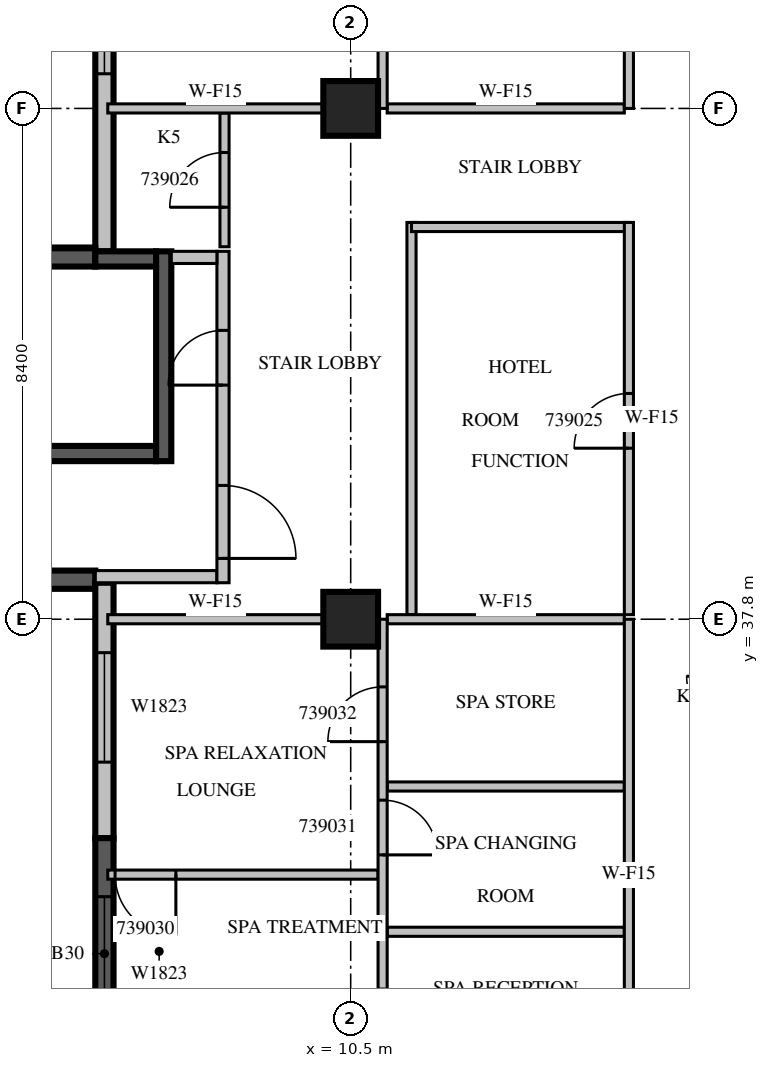
"""IFC4 building model, lengths in metres.
Left out: names, types, materials, properties, quantities, classifications, styles, units other than length and angle.
Written with IfcOpenShell. Run it as: python <this file> out.ifc"""

import sys

from ifc_helpers import new_model, si_unit, direction, frame, frame_2d, origin, origin_2d, place, context, subcontext, project, spatial, rectangle, extrude, source, transform, mapped, element, fill, save


model = new_model("IFC4")
c1 = context("Model", 3, precision=1e-05, world=origin(), true_north=direction((0.0, 1.0)))
c2 = subcontext(c1, "Body", "Model", "MODEL_VIEW")
j1 = project(units=[si_unit("LENGTHUNIT", "METRE"), si_unit("PLANEANGLEUNIT", "RADIAN")], contexts=[c1])
p1 = place(None, origin())
s1 = spatial("IfcSite", under=j1, at=p1, CompositionType="ELEMENT")
p2 = place(p1, origin())
s2 = spatial("IfcBuilding", under=s1, at=p2, CompositionType="ELEMENT")
p3 = place(p2, frame((0.0, 0.0, 181.6)))
s3 = spatial("IfcBuildingStorey", under=s2, at=p3, CompositionType="ELEMENT", Elevation=181.6)
m1 = source(origin(), c2, "Body", "SweptSolid", [
    extrude(rectangle(XDim=0.9, YDim=0.9, at=origin_2d()), origin(), (0.0, 0.0, 1.0), 3.8),
])
for number, where, z_axis, x_axis in (
    (1, (10.5, 37.8, 0.0), (0.0, 0.0, 1.0), (1.0, 0.0, 0.0)),
    (2, (10.5, 46.2, 0.0), (0.0, 0.0, 1.0), (1.0, 0.0, 0.0)),
):
    element("IfcColumn", number, at=place(p3, frame(where, z_axis=z_axis, x_axis=x_axis)), inside=s3, PredefinedType="COLUMN", context=c2, shape_type="MappedRepresentation", body=[
        mapped(m1, transform((0.0, 0.0, 0.0), scale=1.0)),
    ])
m2 = source(origin(), c2, "Body", "SweptSolid", [
    extrude(rectangle(XDim=9.91, YDim=0.3, at=frame_2d((4.955, 0.0))), origin(), (0.0, 0.0, 1.0), 3.4),
])
p4 = place(p3, frame((6.45, 53.76, 0.0), z_axis=(0.0, 0.0, 1.0), x_axis=(0.0, -1.0, 0.0)))
e3 = element("IfcWall", 3, at=p4, inside=s3, PredefinedType="STANDARD", context=c2, shape_type="MappedRepresentation", body=[
    mapped(m2, transform((0.0, 0.0, 0.0), scale=1.0)),
])
m3 = source(origin(), c2, "Body", "SweptSolid", [
    extrude(rectangle(XDim=3.6, YDim=2.3, at=frame_2d((1.8, 1.15))), frame((0.0, 0.16, 0.0), z_axis=(0.0, -1.0, 0.0), x_axis=(1.0, 0.0, 0.0)), (0.0, 0.0, 1.0), 0.32),
])
p5 = place(p4, frame((3.39, 0.0, 0.6)))
e4 = element("IfcOpeningElement", 4, at=p5, cuts=e3, PredefinedType="OPENING", context=c2, shape_type="MappedRepresentation", body=[
    mapped(m3, transform((0.0, 0.0, 0.0), scale=1.0)),
])
m4 = source(origin(), c2, "Body", "SweptSolid", [
    extrude(rectangle(XDim=2.4, YDim=2.3, at=frame_2d((1.2, 1.15))), frame((0.0, 0.16, 0.0), z_axis=(0.0, -1.0, 0.0), x_axis=(1.0, 0.0, 0.0)), (0.0, 0.0, 1.0), 0.32),
])
p6 = place(p4, frame((0.495, 0.0, 0.6)))
e5 = element("IfcOpeningElement", 5, at=p6, cuts=e3, PredefinedType="OPENING", context=c2, shape_type="MappedRepresentation", body=[
    mapped(m4, transform((0.0, 0.0, 0.0), scale=1.0)),
])
m5 = source(origin(), c2, "Body", "SweptSolid", [
    extrude(rectangle(XDim=6.1, YDim=0.3, at=frame_2d((3.05, 0.0))), origin(), (0.0, 0.0, 1.0), 3.4),
])
for number, where, z_axis, x_axis in (
    (6, (6.3, 43.75, 0.0), (0.0, 0.0, 1.0), (-1.0, 0.0, 0.0)),
    (7, (0.2, 38.45, 0.0), (0.0, 0.0, 1.0), (1.0, 0.0, 0.0)),
):
    element("IfcWall", number, at=place(p3, frame(where, z_axis=z_axis, x_axis=x_axis)), inside=s3, PredefinedType="SOLIDWALL", context=c2, shape_type="MappedRepresentation", body=[
        mapped(m5, transform((0.0, 0.0, 0.0), scale=1.0)),
    ])
m6 = source(origin(), c2, "Body", "SweptSolid", [
    extrude(rectangle(XDim=4.2, YDim=0.3, at=frame_2d((2.1, 0.0))), origin(), (0.0, 0.0, 1.0), 3.4),
])
p7 = place(p3, frame((6.45, 38.4, 0.0), z_axis=(0.0, 0.0, 1.0), x_axis=(0.0, -1.0, 0.0)))
e8 = element("IfcWall", 8, at=p7, inside=s3, PredefinedType="STANDARD", context=c2, shape_type="MappedRepresentation", body=[
    mapped(m6, transform((0.0, 0.0, 0.0), scale=1.0)),
])
m7 = source(origin(), c2, "Body", "SweptSolid", [
    extrude(rectangle(XDim=1.8, YDim=2.3, at=frame_2d((0.9, 1.15))), frame((0.0, 0.16, 0.0), z_axis=(0.0, -1.0, 0.0), x_axis=(1.0, 0.0, 0.0)), (0.0, 0.0, 1.0), 0.32),
])
p8 = place(p7, frame((1.15, 0.0, 0.6)))
e9 = element("IfcOpeningElement", 9, at=p8, cuts=e8, PredefinedType="OPENING", context=c2, shape_type="MappedRepresentation", body=[
    mapped(m7, transform((0.0, 0.0, 0.0), scale=1.0)),
])
m8 = source(origin(), c2, "Body", "SweptSolid", [
    extrude(rectangle(XDim=3.8, YDim=0.3, at=frame_2d((1.9, 0.0))), origin(), (0.0, 0.0, 1.0), 3.4),
])
p9 = place(p3, frame((6.45, 34.2, 0.0), z_axis=(0.0, 0.0, 1.0), x_axis=(0.0, -1.0, 0.0)))
e10 = element("IfcWall", 10, at=p9, inside=s3, PredefinedType="SOLIDWALL", context=c2, shape_type="MappedRepresentation", body=[
    mapped(m8, transform((0.0, 0.0, 0.0), scale=1.0)),
])
p10 = place(p9, frame((0.963, 0.0, 0.6)))
e11 = element("IfcOpeningElement", 11, at=p10, cuts=e10, PredefinedType="OPENING", context=c2, shape_type="MappedRepresentation", body=[
    mapped(m7, transform((0.0, 0.0, 0.0), scale=1.0)),
])
m9 = source(origin(), c2, "Body", "SweptSolid", [
    extrude(rectangle(XDim=7.0, YDim=0.25, at=frame_2d((3.5, 0.0))), origin(), (0.0, 0.0, 1.0), 3.4),
])
p11 = place(p3, frame((0.3, 40.525, 0.0), z_axis=(0.0, 0.0, 1.0), x_axis=(1.0, 0.0, 0.0)))
e12 = element("IfcWall", 12, at=p11, inside=s3, PredefinedType="SOLIDWALL", context=c2, shape_type="MappedRepresentation", body=[
    mapped(m9, transform((0.0, 0.0, 0.0), scale=1.0)),
])
m10 = source(origin(), c2, "Body", "SweptSolid", [
    extrude(rectangle(XDim=1.1, YDim=2.1, at=frame_2d((0.55, 1.05))), frame((0.0, 0.135, 0.0), z_axis=(0.0, -1.0, 0.0), x_axis=(1.0, 0.0, 0.0)), (0.0, 0.0, 1.0), 0.27),
])
p12 = place(p11, frame((0.55, 0.0, 0.0)))
e13 = element("IfcOpeningElement", 13, at=p12, cuts=e12, PredefinedType="OPENING", context=c2, shape_type="MappedRepresentation", body=[
    mapped(m10, transform((0.0, 0.0, 0.0), scale=1.0)),
])
m11 = source(origin(), c2, "Body", "SweptSolid", [
    extrude(rectangle(XDim=1.0, YDim=0.25, at=frame_2d((0.5, 0.0))), origin(), (0.0, 0.0, 1.0), 3.4),
])
p13 = place(p3, frame((6.3, 43.725, 0.0), z_axis=(0.0, 0.0, 1.0), x_axis=(1.0, 0.0, 0.0)))
e14 = element("IfcWall", 14, at=p13, inside=s3, PredefinedType="SOLIDWALL", context=c2, shape_type="MappedRepresentation", body=[
    mapped(m11, transform((0.0, 0.0, 0.0), scale=1.0)),
])
m12 = source(origin(), c2, "Body", "SweptSolid", [
    extrude(rectangle(XDim=3.45, YDim=0.25, at=frame_2d((1.725, 0.0))), origin(), (0.0, 0.0, 1.0), 3.4),
])
p14 = place(p3, frame((7.425, 40.4, 0.0), z_axis=(0.0, 0.0, 1.0), x_axis=(0.0, 1.0, 0.0)))
e15 = element("IfcWall", 15, at=p14, inside=s3, PredefinedType="SOLIDWALL", context=c2, shape_type="MappedRepresentation", body=[
    mapped(m12, transform((0.0, 0.0, 0.0), scale=1.0)),
])
m13 = source(origin(), c2, "Body", "SweptSolid", [
    extrude(rectangle(XDim=2.0, YDim=0.2, at=frame_2d((1.0, 0.0))), origin(), (0.0, 0.0, 1.0), 3.4),
])
p15 = place(p3, frame((6.3, 38.5, 0.0), z_axis=(0.0, 0.0, 1.0), x_axis=(1.0, 0.0, 0.0)))
e16 = element("IfcWall", 16, at=p15, inside=s3, PredefinedType="PARTITIONING", context=c2, shape_type="MappedRepresentation", body=[
    mapped(m13, transform((0.0, 0.0, 0.0), scale=1.0)),
])
m14 = source(origin(), c2, "Body", "SweptSolid", [
    extrude(rectangle(XDim=5.45, YDim=0.2, at=frame_2d((2.725, 0.0))), origin(), (0.0, 0.0, 1.0), 3.4),
])
p16 = place(p3, frame((8.4, 38.4, 0.0), z_axis=(0.0, 0.0, 1.0), x_axis=(0.0, 1.0, 0.0)))
e17 = element("IfcWall", 17, at=p16, inside=s3, PredefinedType="PARTITIONING", context=c2, shape_type="MappedRepresentation", body=[
    mapped(m14, transform((0.0, 0.0, 0.0), scale=1.0)),
])
m15 = source(origin(), c2, "Body", "SweptSolid", [
    extrude(rectangle(XDim=1.2, YDim=2.1, at=frame_2d((0.6, 1.05))), frame((0.0, 0.11, 0.0), z_axis=(0.0, -1.0, 0.0), x_axis=(1.0, 0.0, 0.0)), (0.0, 0.0, 1.0), 0.22),
])
p17 = place(p16, frame((0.4, 0.0, 0.0)))
e18 = element("IfcOpeningElement", 18, at=p17, cuts=e17, PredefinedType="OPENING", context=c2, shape_type="MappedRepresentation", body=[
    mapped(m15, transform((0.0, 0.0, 0.0), scale=1.0)),
])
m16 = source(origin(), c2, "Body", "SweptSolid", [
    extrude(rectangle(XDim=0.9, YDim=2.1, at=frame_2d((0.45, 1.05))), frame((0.0, 0.11, 0.0), z_axis=(0.0, -1.0, 0.0), x_axis=(1.0, 0.0, 0.0)), (0.0, 0.0, 1.0), 0.22),
])
p18 = place(p16, frame((3.25, 0.0, 0.0)))
e19 = element("IfcOpeningElement", 19, at=p18, cuts=e17, PredefinedType="OPENING", context=c2, shape_type="MappedRepresentation", body=[
    mapped(m16, transform((0.0, 0.0, 0.0), scale=1.0)),
])
m17 = source(origin(), c2, "Body", "SweptSolid", [
    extrude(rectangle(XDim=0.75, YDim=0.2, at=frame_2d((0.375, 0.0))), origin(), (0.0, 0.0, 1.0), 3.4),
])
p19 = place(p3, frame((7.55, 43.75, 0.0), z_axis=(0.0, 0.0, 1.0), x_axis=(1.0, 0.0, 0.0)))
e20 = element("IfcWall", 20, at=p19, inside=s3, PredefinedType="PARTITIONING", context=c2, shape_type="MappedRepresentation", body=[
    mapped(m17, transform((0.0, 0.0, 0.0), scale=1.0)),
])
m18 = source(origin(), c2, "Body", "SweptSolid", [
    extrude(rectangle(XDim=6.45, YDim=0.15, at=frame_2d((3.225, 0.0))), origin(), (0.0, 0.0, 1.0), 3.4),
])
p20 = place(p3, frame((11.5, 44.325, 0.0), z_axis=(0.0, 0.0, 1.0), x_axis=(0.0, -1.0, 0.0)))
e21 = element("IfcWall", 21, at=p20, inside=s3, PredefinedType="PARTITIONING", context=c2, shape_type="MappedRepresentation", body=[
    mapped(m18, transform((0.0, 0.0, 0.0), scale=1.0)),
])
m19 = source(origin(), c2, "Body", "SweptSolid", [
    extrude(rectangle(XDim=3.575, YDim=0.15, at=frame_2d((1.788, 0.0))), origin(), (0.0, 0.0, 1.0), 3.4),
])
p21 = place(p3, frame((15.075, 44.25, 0.0), z_axis=(0.0, 0.0, 1.0), x_axis=(-1.0, 0.0, 0.0)))
e22 = element("IfcWall", 22, at=p21, inside=s3, PredefinedType="PARTITIONING", context=c2, shape_type="MappedRepresentation", body=[
    mapped(m19, transform((0.0, 0.0, 0.0), scale=1.0)),
])
p22 = place(p3, frame((15.075, 37.875, 0.0), z_axis=(0.0, 0.0, 1.0), x_axis=(0.0, 1.0, 0.0)))
e23 = element("IfcWall", 23, at=p22, inside=s3, PredefinedType="PARTITIONING", context=c2, shape_type="MappedRepresentation", body=[
    mapped(m18, transform((0.0, 0.0, 0.0), scale=1.0)),
])
m20 = source(origin(), c2, "Body", "SweptSolid", [
    extrude(rectangle(XDim=0.9, YDim=2.1, at=frame_2d((0.45, 1.05))), frame((0.0, 0.085, 0.0), z_axis=(0.0, -1.0, 0.0), x_axis=(1.0, 0.0, 0.0)), (0.0, 0.0, 1.0), 0.17),
])
p23 = place(p22, frame((2.737, 0.0, 0.0)))
e24 = element("IfcOpeningElement", 24, at=p23, cuts=e23, PredefinedType="OPENING", context=c2, shape_type="MappedRepresentation", body=[
    mapped(m20, transform((0.0, 0.0, 0.0), scale=1.0)),
])
m21 = source(origin(), c2, "Body", "SweptSolid", [
    extrude(rectangle(XDim=2.2, YDim=0.15, at=frame_2d((1.1, 0.0))), origin(), (0.0, 0.0, 1.0), 3.4),
])
p24 = place(p3, frame((8.425, 43.925, 0.0), z_axis=(0.0, 0.0, 1.0), x_axis=(0.0, 1.0, 0.0)))
e25 = element("IfcWall", 25, at=p24, inside=s3, PredefinedType="PARTITIONING", context=c2, shape_type="MappedRepresentation", body=[
    mapped(m21, transform((0.0, 0.0, 0.0), scale=1.0)),
])
p25 = place(p24, frame((0.65, 0.0, 0.0)))
e26 = element("IfcOpeningElement", 26, at=p25, cuts=e25, PredefinedType="OPENING", context=c2, shape_type="MappedRepresentation", body=[
    mapped(m20, transform((0.0, 0.0, 0.0), scale=1.0)),
])
m22 = source(origin(), c2, "Body", "SweptSolid", [
    extrude(rectangle(XDim=4.445, YDim=0.15, at=frame_2d((2.223, 0.0))), origin(), (0.0, 0.0, 1.0), 3.4),
])
p26 = place(p3, frame((10.95, 33.6, 0.0), z_axis=(0.0, 0.0, 1.0), x_axis=(-1.0, 0.0, 0.0)))
e27 = element("IfcWall", 27, at=p26, inside=s3, PredefinedType="PARTITIONING", context=c2, shape_type="MappedRepresentation", body=[
    mapped(m22, transform((0.0, 0.0, 0.0), scale=1.0)),
])
m23 = source(origin(), c2, "Body", "SweptSolid", [
    extrude(rectangle(XDim=1.0, YDim=2.1, at=frame_2d((0.5, 1.05))), frame((0.0, 0.085, 0.0), z_axis=(0.0, -1.0, 0.0), x_axis=(1.0, 0.0, 0.0)), (0.0, 0.0, 1.0), 0.17),
])
p27 = place(p26, frame((3.325, 0.0, 0.0)))
e28 = element("IfcOpeningElement", 28, at=p27, cuts=e27, PredefinedType="OPENING", context=c2, shape_type="MappedRepresentation", body=[
    mapped(m23, transform((0.0, 0.0, 0.0), scale=1.0)),
])
m24 = source(origin(), c2, "Body", "SweptSolid", [
    extrude(rectangle(XDim=3.9, YDim=0.15, at=frame_2d((1.95, 0.0))), origin(), (0.0, 0.0, 1.0), 3.4),
])
for number, where, z_axis, x_axis in (
    (29, (15.0, 32.66, 0.0), (0.0, 0.0, 1.0), (-1.0, 0.0, 0.0)),
    (30, (15.0, 35.049, 0.0), (0.0, 0.0, 1.0), (-1.0, 0.0, 0.0)),
):
    element("IfcWall", number, at=place(p3, frame(where, z_axis=z_axis, x_axis=x_axis)), inside=s3, PredefinedType="PARTITIONING", context=c2, shape_type="MappedRepresentation", body=[
        mapped(m24, transform((0.0, 0.0, 0.0), scale=1.0)),
    ])
m25 = source(origin(), c2, "Body", "SweptSolid", [
    extrude(rectangle(XDim=3.546, YDim=0.15, at=frame_2d((1.773, 0.0))), origin(), (0.0, 0.0, 1.0), 3.4),
])
p28 = place(p3, frame((10.051, 37.8, 0.0), z_axis=(0.0, 0.0, 1.0), x_axis=(-1.0, 0.0, 0.0)))
e31 = element("IfcWall", 31, at=p28, inside=s3, PredefinedType="PARTITIONING", context=c2, shape_type="MappedRepresentation", body=[
    mapped(m25, transform((0.0, 0.0, 0.0), scale=1.0)),
])
p29 = place(p3, frame((15.0, 37.8, 0.0), z_axis=(0.0, 0.0, 1.0), x_axis=(-1.0, 0.0, 0.0)))
e32 = element("IfcWall", 32, at=p29, inside=s3, PredefinedType="PARTITIONING", context=c2, shape_type="MappedRepresentation", body=[
    mapped(m24, transform((0.0, 0.0, 0.0), scale=1.0)),
])
m26 = source(origin(), c2, "Body", "SweptSolid", [
    extrude(rectangle(XDim=8.4, YDim=0.15, at=frame_2d((4.2, 0.0))), origin(), (0.0, 0.0, 1.0), 3.4),
])
p30 = place(p3, frame((11.025, 29.4, 0.0), z_axis=(0.0, 0.0, 1.0), x_axis=(0.0, 1.0, 0.0)))
e33 = element("IfcWall", 33, at=p30, inside=s3, PredefinedType="PARTITIONING", context=c2, shape_type="MappedRepresentation", body=[
    mapped(m26, transform((0.0, 0.0, 0.0), scale=1.0)),
])
p31 = place(p30, frame((1.418, 0.0, 0.0)))
e34 = element("IfcOpeningElement", 34, at=p31, cuts=e33, PredefinedType="OPENING", context=c2, shape_type="MappedRepresentation", body=[
    mapped(m20, transform((0.0, 0.0, 0.0), scale=1.0)),
])
p32 = place(p30, frame((0.46, 0.0, 0.0)))
e35 = element("IfcOpeningElement", 35, at=p32, cuts=e33, PredefinedType="OPENING", context=c2, shape_type="MappedRepresentation", body=[
    mapped(m20, transform((0.0, 0.0, 0.0), scale=1.0)),
])
p33 = place(p30, frame((4.525, 0.0, 0.0)))
e36 = element("IfcOpeningElement", 36, at=p33, cuts=e33, PredefinedType="OPENING", context=c2, shape_type="MappedRepresentation", body=[
    mapped(m20, transform((0.0, 0.0, 0.0), scale=1.0)),
])
p34 = place(p30, frame((6.387, 0.0, 0.0)))
e37 = element("IfcOpeningElement", 37, at=p34, cuts=e33, PredefinedType="OPENING", context=c2, shape_type="MappedRepresentation", body=[
    mapped(m20, transform((0.0, 0.0, 0.0), scale=1.0)),
])
p35 = place(p3, frame((10.051, 46.2, 0.0), z_axis=(0.0, 0.0, 1.0), x_axis=(-1.0, 0.0, 0.0)))
e38 = element("IfcWall", 38, at=p35, inside=s3, PredefinedType="PARTITIONING", context=c2, shape_type="MappedRepresentation", body=[
    mapped(m25, transform((0.0, 0.0, 0.0), scale=1.0)),
])
p36 = place(p3, frame((15.0, 46.2, 0.0), z_axis=(0.0, 0.0, 1.0), x_axis=(-1.0, 0.0, 0.0)))
e39 = element("IfcWall", 39, at=p36, inside=s3, PredefinedType="PARTITIONING", context=c2, shape_type="MappedRepresentation", body=[
    mapped(m24, transform((0.0, 0.0, 0.0), scale=1.0)),
])
m27 = source(origin(), c2, "Body", "SweptSolid", [
    extrude(rectangle(XDim=7.26, YDim=0.15, at=frame_2d((3.63, 0.0))), origin(), (0.0, 0.0, 1.0), 3.4),
])
p37 = place(p3, frame((11.025, 46.2, 0.0), z_axis=(0.0, 0.0, 1.0), x_axis=(0.0, 1.0, 0.0)))
e40 = element("IfcWall", 40, at=p37, inside=s3, PredefinedType="PARTITIONING", context=c2, shape_type="MappedRepresentation", body=[
    mapped(m27, transform((0.0, 0.0, 0.0), scale=1.0)),
])
m28 = source(origin(), c2, "Body", "SweptSolid", [
    extrude(rectangle(XDim=1.6, YDim=2.1, at=frame_2d((0.8, 1.05))), frame((0.0, 0.085, 0.0), z_axis=(0.0, -1.0, 0.0), x_axis=(1.0, 0.0, 0.0)), (0.0, 0.0, 1.0), 0.17),
])
p38 = place(p37, frame((1.194, 0.0, 0.0)))
e41 = element("IfcOpeningElement", 41, at=p38, cuts=e40, PredefinedType="OPENING", context=c2, shape_type="MappedRepresentation", body=[
    mapped(m28, transform((0.0, 0.0, 0.0), scale=1.0)),
])
p39 = place(p37, frame((4.009, 0.0, 0.0)))
e42 = element("IfcOpeningElement", 42, at=p39, cuts=e40, PredefinedType="OPENING", context=c2, shape_type="MappedRepresentation", body=[
    mapped(m23, transform((0.0, 0.0, 0.0), scale=1.0)),
])
p40 = place(p3, frame((15.075, 29.4, 0.0), z_axis=(0.0, 0.0, 1.0), x_axis=(0.0, 1.0, 0.0)))
e43 = element("IfcWall", 43, at=p40, inside=s3, PredefinedType="PARTITIONING", context=c2, shape_type="MappedRepresentation", body=[
    mapped(m26, transform((0.0, 0.0, 0.0), scale=1.0)),
])
m29 = source(origin(), c2, "Body", "SweptSolid", [
    extrude(rectangle(XDim=1.2, YDim=2.1, at=frame_2d((0.6, 1.05))), frame((0.0, 0.085, 0.0), z_axis=(0.0, -1.0, 0.0), x_axis=(1.0, 0.0, 0.0)), (0.0, 0.0, 1.0), 0.17),
])
p41 = place(p40, frame((1.03, 0.0, 0.0)))
e44 = element("IfcOpeningElement", 44, at=p41, cuts=e43, PredefinedType="OPENING", context=c2, shape_type="MappedRepresentation", body=[
    mapped(m29, transform((0.0, 0.0, 0.0), scale=1.0)),
])
p42 = place(p3, frame((15.075, 46.2, 0.0), z_axis=(0.0, 0.0, 1.0), x_axis=(0.0, 1.0, 0.0)))
e45 = element("IfcWall", 45, at=p42, inside=s3, PredefinedType="PARTITIONING", context=c2, shape_type="MappedRepresentation", body=[
    mapped(m27, transform((0.0, 0.0, 0.0), scale=1.0)),
])
p43 = place(p42, frame((0.956, 0.0, 0.0)))
e46 = element("IfcOpeningElement", 46, at=p43, cuts=e45, PredefinedType="OPENING", context=c2, shape_type="MappedRepresentation", body=[
    mapped(m28, transform((0.0, 0.0, 0.0), scale=1.0)),
])
p44 = place(p42, frame((4.025, 0.0, 0.0)))
e47 = element("IfcOpeningElement", 47, at=p44, cuts=e45, PredefinedType="OPENING", context=c2, shape_type="MappedRepresentation", body=[
    mapped(m20, transform((0.0, 0.0, 0.0), scale=1.0)),
])
m30 = source(origin(), c2, "Body", "SweptSolid", [
    extrude(rectangle(XDim=3.6, YDim=2.3, at=frame_2d((1.8, 1.15))), frame((0.0, 0.03, 0.0), z_axis=(0.0, -1.0, 0.0), x_axis=(1.0, 0.0, 0.0)), (0.0, 0.0, 1.0), 0.06),
])
p45 = place(p5, origin())
e48 = element("IfcWindow", 48, at=p45, inside=s3, PartitioningType="SINGLE_PANEL", PredefinedType="WINDOW", context=c2, shape_type="MappedRepresentation", body=[
    mapped(m30, transform((0.0, 0.0, 0.0), scale=1.0)),
])
fill(e4, e48)
m31 = source(origin(), c2, "Body", "SweptSolid", [
    extrude(rectangle(XDim=1.8, YDim=2.3, at=frame_2d((0.9, 1.15))), frame((0.0, 0.03, 0.0), z_axis=(0.0, -1.0, 0.0), x_axis=(1.0, 0.0, 0.0)), (0.0, 0.0, 1.0), 0.06),
])
p46 = place(p8, origin())
e49 = element("IfcWindow", 49, at=p46, inside=s3, PartitioningType="SINGLE_PANEL", PredefinedType="WINDOW", context=c2, shape_type="MappedRepresentation", body=[
    mapped(m31, transform((0.0, 0.0, 0.0), scale=1.0)),
])
fill(e9, e49)
p47 = place(p10, origin())
e50 = element("IfcWindow", 50, at=p47, inside=s3, PartitioningType="SINGLE_PANEL", PredefinedType="WINDOW", context=c2, shape_type="MappedRepresentation", body=[
    mapped(m31, transform((0.0, 0.0, 0.0), scale=1.0)),
])
fill(e11, e50)
m32 = source(origin(), c2, "Body", "SweptSolid", [
    extrude(rectangle(XDim=1.2, YDim=2.1, at=frame_2d((0.6, 1.05))), frame((0.0, 0.025, 0.0), z_axis=(0.0, -1.0, 0.0), x_axis=(1.0, 0.0, 0.0)), (0.0, 0.0, 1.0), 0.05),
])
p48 = place(p17, origin())
e51 = element("IfcDoor", 51, at=p48, inside=s3, OperationType="SINGLE_SWING_RIGHT", PredefinedType="DOOR", context=c2, shape_type="MappedRepresentation", body=[
    mapped(m32, transform((0.0, 0.0, 0.0), scale=1.0)),
])
fill(e18, e51)
m33 = source(origin(), c2, "Body", "SweptSolid", [
    extrude(rectangle(XDim=0.9, YDim=2.1, at=frame_2d((0.45, 1.05))), frame((0.0, 0.025, 0.0), z_axis=(0.0, -1.0, 0.0), x_axis=(1.0, 0.0, 0.0)), (0.0, 0.0, 1.0), 0.05),
])
p49 = place(p18, origin())
e52 = element("IfcDoor", 52, at=p49, inside=s3, OperationType="SINGLE_SWING_LEFT", PredefinedType="DOOR", context=c2, shape_type="MappedRepresentation", body=[
    mapped(m33, transform((0.0, 0.0, 0.0), scale=1.0)),
])
fill(e19, e52)
p50 = place(p23, origin())
e53 = element("IfcDoor", 53, at=p50, inside=s3, OperationType="SINGLE_SWING_LEFT", PredefinedType="DOOR", context=c2, shape_type="MappedRepresentation", body=[
    mapped(m33, transform((0.0, 0.0, 0.0), scale=1.0)),
])
fill(e24, e53)
p51 = place(p25, origin())
e54 = element("IfcDoor", 54, at=p51, inside=s3, OperationType="SINGLE_SWING_LEFT", PredefinedType="DOOR", context=c2, shape_type="MappedRepresentation", body=[
    mapped(m33, transform((0.0, 0.0, 0.0), scale=1.0)),
])
fill(e26, e54)
m34 = source(origin(), c2, "Body", "SweptSolid", [
    extrude(rectangle(XDim=1.0, YDim=2.1, at=frame_2d((0.5, 1.05))), frame((0.0, 0.025, 0.0), z_axis=(0.0, -1.0, 0.0), x_axis=(1.0, 0.0, 0.0)), (0.0, 0.0, 1.0), 0.05),
])
p52 = place(p27, origin())
e55 = element("IfcDoor", 55, at=p52, inside=s3, OperationType="SINGLE_SWING_LEFT", PredefinedType="DOOR", context=c2, shape_type="MappedRepresentation", body=[
    mapped(m34, transform((0.0, 0.0, 0.0), scale=1.0)),
])
fill(e28, e55)
p53 = place(p33, origin())
e56 = element("IfcDoor", 56, at=p53, inside=s3, OperationType="SINGLE_SWING_RIGHT", PredefinedType="DOOR", context=c2, shape_type="MappedRepresentation", body=[
    mapped(m33, transform((0.0, 0.0, 0.0), scale=1.0)),
])
fill(e36, e56)
p54 = place(p34, origin())
e57 = element("IfcDoor", 57, at=p54, inside=s3, OperationType="SINGLE_SWING_LEFT", PredefinedType="DOOR", context=c2, shape_type="MappedRepresentation", body=[
    mapped(m33, transform((0.0, 0.0, 0.0), scale=1.0)),
])
fill(e37, e57)
save(model, sys.argv[1])
